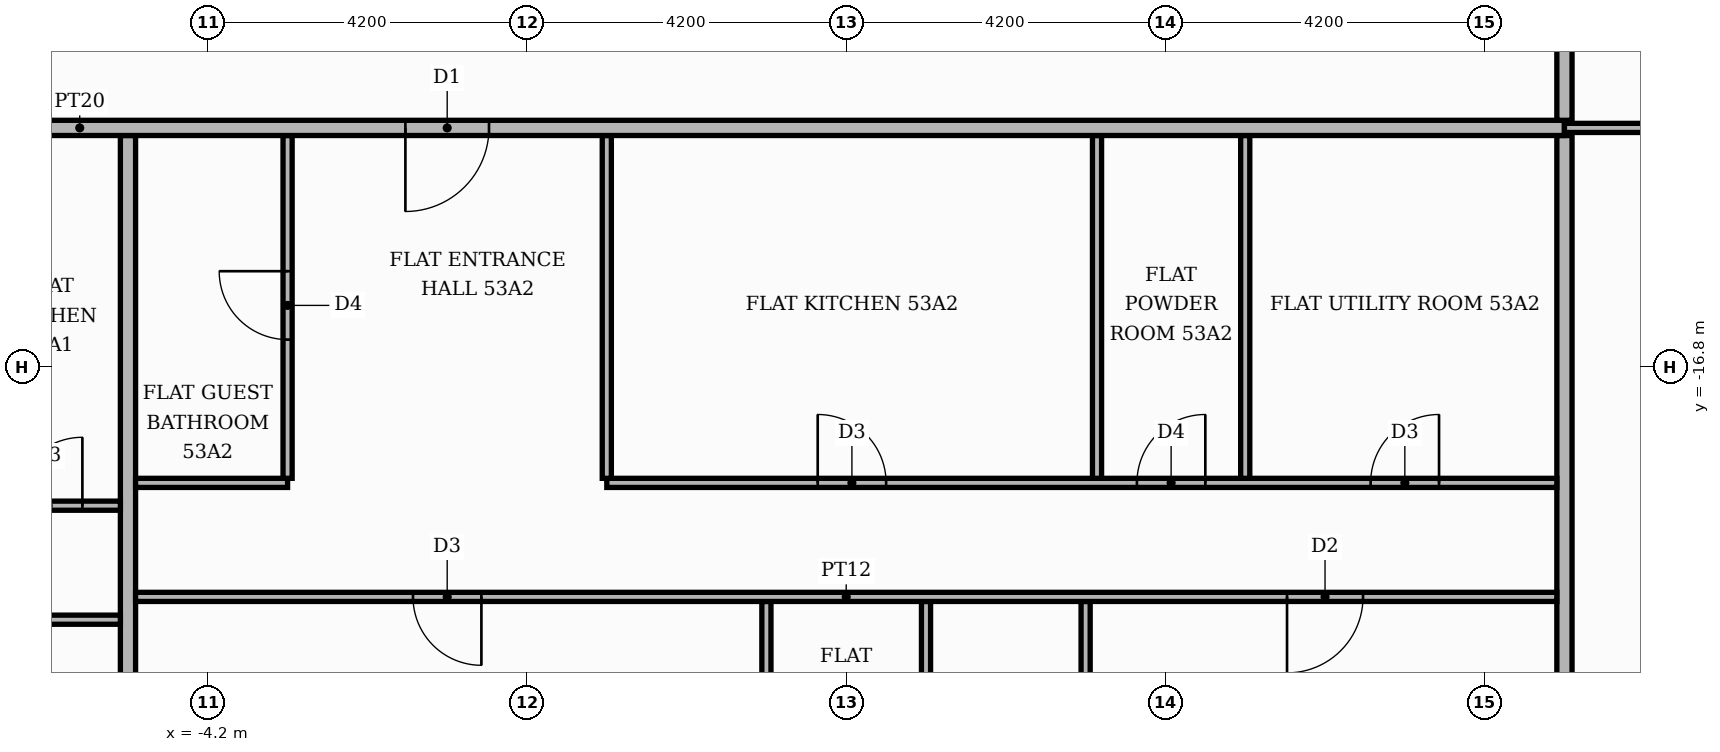
"""IFC4 building model, lengths in metres.
Left out: names, types, materials, properties, quantities, classifications, styles, units other than length and angle.
Written with IfcOpenShell. Run it as: python <this file> out.ifc"""

import sys

from ifc_helpers import new_model, si_unit, direction, frame, frame_2d, origin, place, context, subcontext, project, spatial, rectangle, extrude, element, fill, save


model = new_model("IFC4")
c1 = context("Model", 3, precision=1e-05, world=origin(), true_north=direction((0.0, 1.0)))
c2 = subcontext(c1, "Body", "Model", "MODEL_VIEW")
j1 = project(units=[si_unit("LENGTHUNIT", "METRE"), si_unit("PLANEANGLEUNIT", "RADIAN")], contexts=[c1])
p1 = place(None, origin())
s1 = spatial("IfcSite", under=j1, at=p1, CompositionType="ELEMENT")
p2 = place(p1, origin())
s2 = spatial("IfcBuilding", under=s1, at=p2, CompositionType="ELEMENT")
p3 = place(p2, frame((0.0, 0.0, 223.5)))
s3 = spatial("IfcBuildingStorey", under=s2, at=p3, CompositionType="ELEMENT", Elevation=223.5)
p4 = place(p3, frame((-5.25, -25.42, 0.0), z_axis=(0.0, 0.0, 1.0), x_axis=(0.0, 1.0, 0.0)))
e1 = element("IfcWall", 1, at=p4, inside=s3, PredefinedType="PARTITIONING", context=c2, shape_type="SweptSolid", body=[
    extrude(rectangle(XDim=11.67, YDim=0.2, at=frame_2d((5.835, 0.0))), origin(), (0.0, 0.0, 1.0), 3.48),
])
p5 = place(p3, frame((3.15, -25.42, 0.0), z_axis=(0.0, 0.0, 1.0), x_axis=(0.0, 1.0, 0.0)))
e2 = element("IfcWall", 2, at=p5, inside=s3, PredefinedType="PARTITIONING", context=c2, shape_type="SweptSolid", body=[
    extrude(rectangle(XDim=5.54, YDim=0.12, at=frame_2d((2.77, 0.0))), origin(), (0.0, 0.0, 1.0), 3.48),
])
p6 = place(p5, frame((2.2, 0.0, 0.0)))
e3 = element("IfcOpeningElement", 3, at=p6, cuts=e2, PredefinedType="OPENING", context=c2, shape_type="SweptSolid", body=[
    extrude(rectangle(XDim=0.9, YDim=2.1, at=frame_2d((0.45, 1.05))), frame((0.0, 0.07, 0.0), z_axis=(0.0, -1.0, 0.0), x_axis=(1.0, 0.0, 0.0)), (0.0, 0.0, 1.0), 0.14),
])
p7 = place(p3, frame((5.25, -25.42, 0.0), z_axis=(0.0, 0.0, 1.0), x_axis=(0.0, 1.0, 0.0)))
e4 = element("IfcWall", 4, at=p7, inside=s3, PredefinedType="PARTITIONING", context=c2, shape_type="SweptSolid", body=[
    extrude(rectangle(XDim=5.54, YDim=0.12, at=frame_2d((2.77, 0.0))), origin(), (0.0, 0.0, 1.0), 3.48),
])
p8 = place(p7, frame((2.2, 0.0, 0.0)))
e5 = element("IfcOpeningElement", 5, at=p8, cuts=e4, PredefinedType="OPENING", context=c2, shape_type="SweptSolid", body=[
    extrude(rectangle(XDim=0.9, YDim=2.1, at=frame_2d((0.45, 1.05))), frame((0.0, 0.07, 0.0), z_axis=(0.0, -1.0, 0.0), x_axis=(1.0, 0.0, 0.0)), (0.0, 0.0, 1.0), 0.14),
])
p9 = place(p3, frame((7.35, -25.42, 0.0), z_axis=(0.0, 0.0, 1.0), x_axis=(0.0, 1.0, 0.0)))
e6 = element("IfcWall", 6, at=p9, inside=s3, PredefinedType="PARTITIONING", context=c2, shape_type="SweptSolid", body=[
    extrude(rectangle(XDim=5.54, YDim=0.12, at=frame_2d((2.77, 0.0))), origin(), (0.0, 0.0, 1.0), 3.48),
])
p10 = place(p3, frame((13.65, -25.42, 0.0), z_axis=(0.0, 0.0, 1.0), x_axis=(0.0, 1.0, 0.0)))
e7 = element("IfcWall", 7, at=p10, inside=s3, PredefinedType="PARTITIONING", context=c2, shape_type="SweptSolid", body=[
    extrude(rectangle(XDim=11.67, YDim=0.2, at=frame_2d((5.835, 0.0))), origin(), (0.0, 0.0, 1.0), 3.48),
])
p11 = place(p3, frame((-25.42, -20.12, 0.0), z_axis=(0.0, 0.0, 1.0), x_axis=(1.0, 0.0, 0.0)))
e8 = element("IfcWall", 8, at=p11, inside=s3, PredefinedType="PARTITIONING", context=c2, shape_type="SweptSolid", body=[
    extrude(rectangle(XDim=20.07, YDim=0.12, at=frame_2d((10.035, 0.0))), origin(), (0.0, 0.0, 1.0), 3.48),
])
p12 = place(p11, frame((10.22, 0.0, 0.0)))
e9 = element("IfcOpeningElement", 9, at=p12, cuts=e8, PredefinedType="OPENING", context=c2, shape_type="SweptSolid", body=[
    extrude(rectangle(XDim=1.0, YDim=2.1, at=frame_2d((0.5, 1.05))), frame((0.0, 0.07, 0.0), z_axis=(0.0, -1.0, 0.0), x_axis=(1.0, 0.0, 0.0)), (0.0, 0.0, 1.0), 0.14),
])
p13 = place(p11, frame((13.42, 0.0, 0.0)))
e10 = element("IfcOpeningElement", 10, at=p13, cuts=e8, PredefinedType="OPENING", context=c2, shape_type="SweptSolid", body=[
    extrude(rectangle(XDim=0.9, YDim=2.1, at=frame_2d((0.45, 1.05))), frame((0.0, 0.07, 0.0), z_axis=(0.0, -1.0, 0.0), x_axis=(1.0, 0.0, 0.0)), (0.0, 0.0, 1.0), 0.14),
])
p14 = place(p3, frame((-5.15, -19.82, 0.0), z_axis=(0.0, 0.0, 1.0), x_axis=(1.0, 0.0, 0.0)))
e11 = element("IfcWall", 11, at=p14, inside=s3, PredefinedType="PARTITIONING", context=c2, shape_type="SweptSolid", body=[
    extrude(rectangle(XDim=18.7, YDim=0.12, at=frame_2d((9.35, 0.0))), origin(), (0.0, 0.0, 1.0), 3.48),
])
p15 = place(p14, frame((3.65, 0.0, 0.0)))
e12 = element("IfcOpeningElement", 12, at=p15, cuts=e11, PredefinedType="OPENING", context=c2, shape_type="SweptSolid", body=[
    extrude(rectangle(XDim=0.9, YDim=2.1, at=frame_2d((0.45, 1.05))), frame((0.0, 0.07, 0.0), z_axis=(0.0, -1.0, 0.0), x_axis=(1.0, 0.0, 0.0)), (0.0, 0.0, 1.0), 0.14),
])
p16 = place(p14, frame((15.15, 0.0, 0.0)))
e13 = element("IfcOpeningElement", 13, at=p16, cuts=e11, PredefinedType="OPENING", context=c2, shape_type="SweptSolid", body=[
    extrude(rectangle(XDim=1.0, YDim=2.1, at=frame_2d((0.5, 1.05))), frame((0.0, 0.07, 0.0), z_axis=(0.0, -1.0, 0.0), x_axis=(1.0, 0.0, 0.0)), (0.0, 0.0, 1.0), 0.14),
])
p17 = place(p3, frame((-9.45, -18.62, 0.0), z_axis=(0.0, 0.0, 1.0), x_axis=(1.0, 0.0, 0.0)))
e14 = element("IfcWall", 14, at=p17, inside=s3, PredefinedType="PARTITIONING", context=c2, shape_type="SweptSolid", body=[
    extrude(rectangle(XDim=4.1, YDim=0.12, at=frame_2d((2.05, 0.0))), origin(), (0.0, 0.0, 1.0), 3.48),
])
p18 = place(p17, frame((2.7, 0.0, 0.0)))
e15 = element("IfcOpeningElement", 15, at=p18, cuts=e14, PredefinedType="OPENING", context=c2, shape_type="SweptSolid", body=[
    extrude(rectangle(XDim=0.9, YDim=2.1, at=frame_2d((0.45, 1.05))), frame((0.0, 0.07, 0.0), z_axis=(0.0, -1.0, 0.0), x_axis=(1.0, 0.0, 0.0)), (0.0, 0.0, 1.0), 0.14),
])
p19 = place(p3, frame((-5.15, -18.32, 0.0), z_axis=(0.0, 0.0, 1.0), x_axis=(1.0, 0.0, 0.0)))
e16 = element("IfcWall", 16, at=p19, inside=s3, PredefinedType="PARTITIONING", context=c2, shape_type="SweptSolid", body=[
    extrude(rectangle(XDim=2.0, YDim=0.12, at=frame_2d((1.0, 0.0))), origin(), (0.0, 0.0, 1.0), 3.48),
])
p20 = place(p3, frame((1.05, -18.32, 0.0), z_axis=(0.0, 0.0, 1.0), x_axis=(1.0, 0.0, 0.0)))
e17 = element("IfcWall", 17, at=p20, inside=s3, PredefinedType="PARTITIONING", context=c2, shape_type="SweptSolid", body=[
    extrude(rectangle(XDim=12.5, YDim=0.12, at=frame_2d((6.25, 0.0))), origin(), (0.0, 0.0, 1.0), 3.48),
])
p21 = place(p20, frame((2.775, 0.0, 0.0)))
e18 = element("IfcOpeningElement", 18, at=p21, cuts=e17, PredefinedType="OPENING", context=c2, shape_type="SweptSolid", body=[
    extrude(rectangle(XDim=0.9, YDim=2.1, at=frame_2d((0.45, 1.05))), frame((0.0, 0.07, 0.0), z_axis=(0.0, -1.0, 0.0), x_axis=(1.0, 0.0, 0.0)), (0.0, 0.0, 1.0), 0.14),
])
p22 = place(p20, frame((6.975, 0.0, 0.0)))
e19 = element("IfcOpeningElement", 19, at=p22, cuts=e17, PredefinedType="OPENING", context=c2, shape_type="SweptSolid", body=[
    extrude(rectangle(XDim=0.9, YDim=2.1, at=frame_2d((0.45, 1.05))), frame((0.0, 0.07, 0.0), z_axis=(0.0, -1.0, 0.0), x_axis=(1.0, 0.0, 0.0)), (0.0, 0.0, 1.0), 0.14),
])
p23 = place(p20, frame((10.05, 0.0, 0.0)))
e20 = element("IfcOpeningElement", 20, at=p23, cuts=e17, PredefinedType="OPENING", context=c2, shape_type="SweptSolid", body=[
    extrude(rectangle(XDim=0.9, YDim=2.1, at=frame_2d((0.45, 1.05))), frame((0.0, 0.07, 0.0), z_axis=(0.0, -1.0, 0.0), x_axis=(1.0, 0.0, 0.0)), (0.0, 0.0, 1.0), 0.14),
])
p24 = place(p3, frame((-3.15, -18.26, 0.0), z_axis=(0.0, 0.0, 1.0), x_axis=(0.0, 1.0, 0.0)))
e21 = element("IfcWall", 21, at=p24, inside=s3, PredefinedType="PARTITIONING", context=c2, shape_type="SweptSolid", body=[
    extrude(rectangle(XDim=4.51, YDim=0.12, at=frame_2d((2.255, 0.0))), origin(), (0.0, 0.0, 1.0), 3.48),
])
p25 = place(p24, frame((1.825, 0.0, 0.0)))
e22 = element("IfcOpeningElement", 22, at=p25, cuts=e21, PredefinedType="OPENING", context=c2, shape_type="SweptSolid", body=[
    extrude(rectangle(XDim=0.9, YDim=2.1, at=frame_2d((0.45, 1.05))), frame((0.0, 0.07, 0.0), z_axis=(0.0, -1.0, 0.0), x_axis=(1.0, 0.0, 0.0)), (0.0, 0.0, 1.0), 0.14),
])
for number, where, z_axis, x_axis in (
    (23, (1.05, -18.26, 0.0), (0.0, 0.0, 1.0), (0.0, 1.0, 0.0)),
    (24, (7.5, -18.26, 0.0), (0.0, 0.0, 1.0), (0.0, 1.0, 0.0)),
    (25, (9.45, -18.26, 0.0), (0.0, 0.0, 1.0), (0.0, 1.0, 0.0)),
):
    element("IfcWall", number, at=place(p3, frame(where, z_axis=z_axis, x_axis=x_axis)), inside=s3, PredefinedType="PARTITIONING", context=c2, shape_type="SweptSolid", body=[
        extrude(rectangle(XDim=4.51, YDim=0.12, at=frame_2d((2.255, 0.0))), origin(), (0.0, 0.0, 1.0), 3.48),
    ])
p26 = place(p3, frame((-25.42, -13.65, 0.0), z_axis=(0.0, 0.0, 1.0), x_axis=(1.0, 0.0, 0.0)))
e26 = element("IfcWall", 26, at=p26, inside=s3, PredefinedType="PARTITIONING", context=c2, shape_type="SweptSolid", body=[
    extrude(rectangle(XDim=39.07, YDim=0.2, at=frame_2d((19.535, 0.0))), origin(), (0.0, 0.0, 1.0), 3.48),
])
p27 = place(p26, frame((13.32, 0.0, 0.0)))
e27 = element("IfcOpeningElement", 27, at=p27, cuts=e26, PredefinedType="OPENING", context=c2, shape_type="SweptSolid", body=[
    extrude(rectangle(XDim=1.1, YDim=2.4, at=frame_2d((0.55, 1.2))), frame((0.0, 0.11, 0.0), z_axis=(0.0, -1.0, 0.0), x_axis=(1.0, 0.0, 0.0)), (0.0, 0.0, 1.0), 0.22),
])
p28 = place(p26, frame((23.82, 0.0, 0.0)))
e28 = element("IfcOpeningElement", 28, at=p28, cuts=e26, PredefinedType="OPENING", context=c2, shape_type="SweptSolid", body=[
    extrude(rectangle(XDim=1.1, YDim=2.4, at=frame_2d((0.55, 1.2))), frame((0.0, 0.11, 0.0), z_axis=(0.0, -1.0, 0.0), x_axis=(1.0, 0.0, 0.0)), (0.0, 0.0, 1.0), 0.22),
])
p29 = place(p3, frame((13.65, -13.65, 0.0), z_axis=(0.0, 0.0, 1.0), x_axis=(1.0, 0.0, 0.0)))
e29 = element("IfcWall", 29, at=p29, inside=s3, PredefinedType="PARTITIONING", context=c2, shape_type="SweptSolid", body=[
    extrude(rectangle(XDim=6.77, YDim=0.12, at=frame_2d((3.385, 0.0))), origin(), (0.0, 0.0, 1.0), 3.48),
])
p30 = place(p29, frame((2.935, 0.0, 0.0)))
e30 = element("IfcOpeningElement", 30, at=p30, cuts=e29, PredefinedType="OPENING", context=c2, shape_type="SweptSolid", body=[
    extrude(rectangle(XDim=0.9, YDim=2.1, at=frame_2d((0.45, 1.05))), frame((0.0, 0.07, 0.0), z_axis=(0.0, -1.0, 0.0), x_axis=(1.0, 0.0, 0.0)), (0.0, 0.0, 1.0), 0.14),
])
p31 = place(p3, frame((13.65, -13.55, 0.0), z_axis=(0.0, 0.0, 1.0), x_axis=(0.0, 1.0, 0.0)))
e31 = element("IfcWall", 31, at=p31, inside=s3, PredefinedType="PARTITIONING", context=c2, shape_type="SweptSolid", body=[
    extrude(rectangle(XDim=2.45, YDim=0.2, at=frame_2d((1.225, 0.0))), origin(), (0.0, 0.0, 1.0), 3.48),
])
p32 = place(p18, origin())
e32 = element("IfcDoor", 32, at=p32, inside=s3, OperationType="SINGLE_SWING_RIGHT", PredefinedType="DOOR", context=c2, shape_type="SweptSolid", body=[
    extrude(rectangle(XDim=0.9, YDim=2.1, at=frame_2d((0.45, 1.05))), frame((0.0, 0.025, 0.0), z_axis=(0.0, -1.0, 0.0), x_axis=(1.0, 0.0, 0.0)), (0.0, 0.0, 1.0), 0.05),
])
fill(e15, e32)
p33 = place(p28, frame((1.1, 0.0, 0.0), z_axis=(0.0, 0.0, 1.0), x_axis=(-1.0, 0.0, 0.0)))
e33 = element("IfcDoor", 33, at=p33, inside=s3, OperationType="SINGLE_SWING_LEFT", PredefinedType="DOOR", context=c2, shape_type="SweptSolid", body=[
    extrude(rectangle(XDim=1.1, YDim=2.4, at=frame_2d((0.55, 1.2))), frame((0.0, 0.025, 0.0), z_axis=(0.0, -1.0, 0.0), x_axis=(1.0, 0.0, 0.0)), (0.0, 0.0, 1.0), 0.05),
])
fill(e28, e33)
p34 = place(p25, origin())
e34 = element("IfcDoor", 34, at=p34, inside=s3, OperationType="SINGLE_SWING_RIGHT", PredefinedType="DOOR", context=c2, shape_type="SweptSolid", body=[
    extrude(rectangle(XDim=0.9, YDim=2.1, at=frame_2d((0.45, 1.05))), frame((0.0, 0.025, 0.0), z_axis=(0.0, -1.0, 0.0), x_axis=(1.0, 0.0, 0.0)), (0.0, 0.0, 1.0), 0.05),
])
fill(e22, e34)
p35 = place(p21, origin())
e35 = element("IfcDoor", 35, at=p35, inside=s3, OperationType="SINGLE_SWING_LEFT", PredefinedType="DOOR", context=c2, shape_type="SweptSolid", body=[
    extrude(rectangle(XDim=0.9, YDim=2.1, at=frame_2d((0.45, 1.05))), frame((0.0, 0.025, 0.0), z_axis=(0.0, -1.0, 0.0), x_axis=(1.0, 0.0, 0.0)), (0.0, 0.0, 1.0), 0.05),
])
fill(e18, e35)
p36 = place(p22, origin())
e36 = element("IfcDoor", 36, at=p36, inside=s3, OperationType="SINGLE_SWING_RIGHT", PredefinedType="DOOR", context=c2, shape_type="SweptSolid", body=[
    extrude(rectangle(XDim=0.9, YDim=2.1, at=frame_2d((0.45, 1.05))), frame((0.0, 0.025, 0.0), z_axis=(0.0, -1.0, 0.0), x_axis=(1.0, 0.0, 0.0)), (0.0, 0.0, 1.0), 0.05),
])
fill(e19, e36)
p37 = place(p23, origin())
e37 = element("IfcDoor", 37, at=p37, inside=s3, OperationType="SINGLE_SWING_RIGHT", PredefinedType="DOOR", context=c2, shape_type="SweptSolid", body=[
    extrude(rectangle(XDim=0.9, YDim=2.1, at=frame_2d((0.45, 1.05))), frame((0.0, 0.025, 0.0), z_axis=(0.0, -1.0, 0.0), x_axis=(1.0, 0.0, 0.0)), (0.0, 0.0, 1.0), 0.05),
])
fill(e20, e37)
p38 = place(p15, frame((0.9, 0.0, 0.0), z_axis=(0.0, 0.0, 1.0), x_axis=(-1.0, 0.0, 0.0)))
e38 = element("IfcDoor", 38, at=p38, inside=s3, OperationType="SINGLE_SWING_RIGHT", PredefinedType="DOOR", context=c2, shape_type="SweptSolid", body=[
    extrude(rectangle(XDim=0.9, YDim=2.1, at=frame_2d((0.45, 1.05))), frame((0.0, 0.025, 0.0), z_axis=(0.0, -1.0, 0.0), x_axis=(1.0, 0.0, 0.0)), (0.0, 0.0, 1.0), 0.05),
])
fill(e12, e38)
p39 = place(p16, frame((1.0, 0.0, 0.0), z_axis=(0.0, 0.0, 1.0), x_axis=(-1.0, 0.0, 0.0)))
e39 = element("IfcDoor", 39, at=p39, inside=s3, OperationType="SINGLE_SWING_LEFT", PredefinedType="DOOR", context=c2, shape_type="SweptSolid", body=[
    extrude(rectangle(XDim=1.0, YDim=2.1, at=frame_2d((0.5, 1.05))), frame((0.0, 0.025, 0.0), z_axis=(0.0, -1.0, 0.0), x_axis=(1.0, 0.0, 0.0)), (0.0, 0.0, 1.0), 0.05),
])
fill(e13, e39)
save(model, sys.argv[1])
